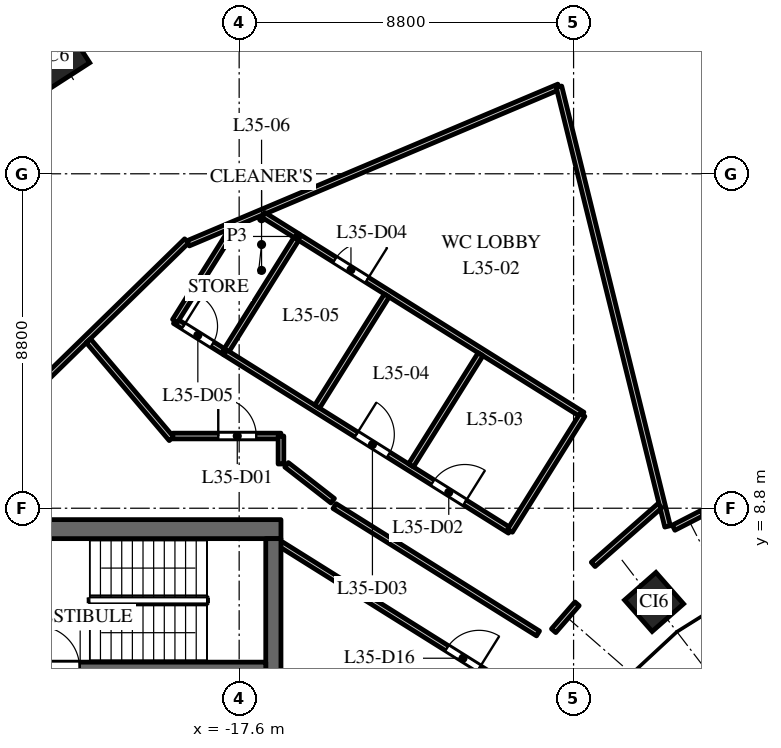
"""IFC4 building model, lengths in metres.
Left out: names, types, materials, properties, quantities, classifications, styles, units other than length and angle.
Written with IfcOpenShell. Run it as: python <this file> out.ifc"""

import sys

from ifc_helpers import new_model, si_unit, direction, frame, frame_2d, origin, origin_2d, place, context, subcontext, project, spatial, rectangle, extrude, element, fill, save


model = new_model("IFC4")
c1 = context("Model", 3, precision=1e-05, world=origin(), true_north=direction((0.0, 1.0)))
c2 = subcontext(c1, "Body", "Model", "MODEL_VIEW")
j1 = project(units=[si_unit("LENGTHUNIT", "METRE"), si_unit("PLANEANGLEUNIT", "RADIAN")], contexts=[c1])
p1 = place(None, origin())
s1 = spatial("IfcSite", under=j1, at=p1, CompositionType="ELEMENT")
p2 = place(p1, origin())
s2 = spatial("IfcBuilding", under=s1, at=p2, CompositionType="ELEMENT")
p3 = place(p2, frame((0.0, 0.0, 154.0)))
s3 = spatial("IfcBuildingStorey", under=s2, at=p3, CompositionType="ELEMENT", Elevation=154.0)
p4 = place(p3, frame((-22.362, 20.7, 0.0), z_axis=(0.0, 0.0, 1.0), x_axis=(-0.840247639643, -0.542202825586, 0.0)))
e1 = element("IfcColumn", 1, at=p4, inside=s3, PredefinedType="COLUMN", context=c2, shape_type="SweptSolid", body=[
    extrude(rectangle(XDim=1.2, YDim=1.2, at=origin_2d()), origin(), (0.0, 0.0, 1.0), 4.0),
])
p5 = place(p3, frame((-6.682, 6.334, 0.0), z_axis=(0.0, 0.0, 1.0), x_axis=(-0.75102249095, -0.660276622399, 0.0)))
e2 = element("IfcColumn", 2, at=p5, inside=s3, PredefinedType="COLUMN", context=c2, shape_type="SweptSolid", body=[
    extrude(rectangle(XDim=1.1, YDim=1.1, at=origin_2d()), origin(), (0.0, 0.0, 1.0), 4.0),
])
p6 = place(p3, frame((-16.5, 8.25, 0.0), z_axis=(0.0, 0.0, 1.0), x_axis=(-1.0, 0.0, 0.0)))
e3 = element("IfcWall", 3, at=p6, inside=s3, PredefinedType="SHEAR", context=c2, shape_type="SweptSolid", body=[
    extrude(rectangle(XDim=15.0, YDim=0.5, at=frame_2d((7.5, 0.0))), origin(), (0.0, 0.0, 1.0), 3.7),
])
p7 = place(p6, frame((6.9, 0.0, 0.0)))
e4 = element("IfcOpeningElement", 4, at=p7, cuts=e3, PredefinedType="OPENING", context=c2, shape_type="SweptSolid", body=[
    extrude(rectangle(XDim=1.2, YDim=2.1, at=frame_2d((0.6, 1.05))), frame((0.0, 0.26, 0.0), z_axis=(0.0, -1.0, 0.0), x_axis=(1.0, 0.0, 0.0)), (0.0, 0.0, 1.0), 0.52),
])
p8 = place(p6, frame((12.05, 0.0, 0.0)))
e5 = element("IfcOpeningElement", 5, at=p8, cuts=e3, PredefinedType="OPENING", context=c2, shape_type="SweptSolid", body=[
    extrude(rectangle(XDim=0.9, YDim=2.1, at=frame_2d((0.45, 1.05))), frame((0.0, 0.26, 0.0), z_axis=(0.0, -1.0, 0.0), x_axis=(1.0, 0.0, 0.0)), (0.0, 0.0, 1.0), 0.52),
])
p9 = place(p3, frame((-16.7, -8.0, 0.0), z_axis=(0.0, 0.0, 1.0), x_axis=(0.0, 1.0, 0.0)))
e6 = element("IfcWall", 6, at=p9, inside=s3, PredefinedType="SHEAR", context=c2, shape_type="SweptSolid", body=[
    extrude(rectangle(XDim=16.0, YDim=0.4, at=frame_2d((8.0, 0.0))), origin(), (0.0, 0.0, 1.0), 3.7),
])
p10 = place(p3, frame((-16.9, 4.6, 0.0), z_axis=(0.0, 0.0, 1.0), x_axis=(-1.0, 0.0, 0.0)))
e7 = element("IfcWall", 7, at=p10, inside=s3, PredefinedType="SHEAR", context=c2, shape_type="SweptSolid", body=[
    extrude(rectangle(XDim=6.18, YDim=0.3, at=frame_2d((3.09, 0.0))), origin(), (0.0, 0.0, 1.0), 3.7),
])
p11 = place(p10, frame((4.9, 0.0, 0.0)))
e8 = element("IfcOpeningElement", 8, at=p11, cuts=e7, PredefinedType="OPENING", context=c2, shape_type="SweptSolid", body=[
    extrude(rectangle(XDim=1.1, YDim=2.1, at=frame_2d((0.55, 1.05))), frame((0.0, 0.16, 0.0), z_axis=(0.0, -1.0, 0.0), x_axis=(1.0, 0.0, 0.0)), (0.0, 0.0, 1.0), 0.32),
])
p12 = place(p3, frame((-24.166, 10.778, 0.0), z_axis=(0.0, 0.0, 1.0), x_axis=(0.715834142481, 0.698270349119, 0.0)))
e9 = element("IfcWall", 9, at=p12, inside=s3, PredefinedType="PARTITIONING", context=c2, shape_type="SweptSolid", body=[
    extrude(rectangle(XDim=7.242, YDim=0.15, at=frame_2d((3.621, 0.0))), origin(), (0.0, 0.0, 1.0), 2.75),
])
p13 = place(p3, frame((-21.568, 13.207, 0.0), z_axis=(0.0, 0.0, 1.0), x_axis=(0.646414818584, -0.762986161287, 0.0)))
e10 = element("IfcWall", 10, at=p13, inside=s3, PredefinedType="PARTITIONING", context=c2, shape_type="SweptSolid", body=[
    extrude(rectangle(XDim=3.38, YDim=0.15, at=frame_2d((1.69, 0.0))), origin(), (0.0, 0.0, 1.0), 3.7),
])
p14 = place(p3, frame((-19.347, 10.7, 0.0), z_axis=(0.0, 0.0, 1.0), x_axis=(1.0, 0.0, 0.0)))
e11 = element("IfcWall", 11, at=p14, inside=s3, PredefinedType="PARTITIONING", context=c2, shape_type="SweptSolid", body=[
    extrude(rectangle(XDim=2.847, YDim=0.15, at=frame_2d((1.423, 0.0))), origin(), (0.0, 0.0, 1.0), 3.7),
])
p15 = place(p14, frame((1.197, 0.0, 0.0)))
e12 = element("IfcOpeningElement", 12, at=p15, cuts=e11, PredefinedType="OPENING", context=c2, shape_type="SweptSolid", body=[
    extrude(rectangle(XDim=1.0, YDim=2.1, at=frame_2d((0.5, 1.05))), frame((0.0, 0.085, 0.0), z_axis=(0.0, -1.0, 0.0), x_axis=(1.0, 0.0, 0.0)), (0.0, 0.0, 1.0), 0.17),
])
p16 = place(p3, frame((-19.289, 13.727, 0.0), z_axis=(0.0, 0.0, 1.0), x_axis=(0.847461540706, -0.530856795213, 0.0)))
e13 = element("IfcWall", 13, at=p16, inside=s3, PredefinedType="PARTITIONING", context=c2, shape_type="SweptSolid", body=[
    extrude(rectangle(XDim=1.56, YDim=0.15, at=frame_2d((0.78, 0.0))), origin(), (0.0, 0.0, 1.0), 2.75),
])
p17 = place(p16, frame((0.26, 0.0, 0.0)))
e14 = element("IfcOpeningElement", 14, at=p17, cuts=e13, PredefinedType="OPENING", context=c2, shape_type="SweptSolid", body=[
    extrude(rectangle(XDim=0.9, YDim=2.1, at=frame_2d((0.45, 1.05))), frame((0.0, 0.085, 0.0), z_axis=(0.0, -1.0, 0.0), x_axis=(1.0, 0.0, 0.0)), (0.0, 0.0, 1.0), 0.17),
])
p18 = place(p3, frame((-19.289, 13.727, 0.0), z_axis=(0.0, 0.0, 1.0), x_axis=(0.530805348015, 0.847493765475, 0.0)))
e15 = element("IfcWall", 15, at=p18, inside=s3, PredefinedType="PARTITIONING", context=c2, shape_type="SweptSolid", body=[
    extrude(rectangle(XDim=2.911, YDim=0.15, at=frame_2d((1.456, 0.0))), origin(), (0.0, 0.0, 1.0), 3.7),
])
p19 = place(p3, frame((-18.94, 15.771, 0.0), z_axis=(0.0, 0.0, 1.0), x_axis=(0.921243869672, 0.3889855172, 0.0)))
e16 = element("IfcWall", 16, at=p19, inside=s3, PredefinedType="PARTITIONING", context=c2, shape_type="SweptSolid", body=[
    extrude(rectangle(XDim=10.589, YDim=0.15, at=frame_2d((5.294, 0.0))), origin(), (0.0, 0.0, 1.0), 2.85),
])
p20 = place(p3, frame((-17.967, 12.899, 0.0), z_axis=(0.0, 0.0, 1.0), x_axis=(0.530723957916, 0.847544736574, 0.0)))
e17 = element("IfcWall", 17, at=p20, inside=s3, PredefinedType="PARTITIONING", context=c2, shape_type="SweptSolid", body=[
    extrude(rectangle(XDim=3.601, YDim=0.15, at=frame_2d((1.801, 0.0))), origin(), (0.0, 0.0, 1.0), 3.7),
])
p21 = place(p3, frame((-17.967, 12.899, 0.0), z_axis=(0.0, 0.0, 1.0), x_axis=(0.847599321369, -0.530636778234, 0.0)))
e18 = element("IfcWall", 18, at=p21, inside=s3, PredefinedType="PARTITIONING", context=c2, shape_type="SweptSolid", body=[
    extrude(rectangle(XDim=8.84, YDim=0.15, at=frame_2d((4.42, 0.0))), origin(), (0.0, 0.0, 1.0), 2.75),
])
p22 = place(p21, frame((6.44, 0.0, 0.0)))
e19 = element("IfcOpeningElement", 19, at=p22, cuts=e18, PredefinedType="OPENING", context=c2, shape_type="SweptSolid", body=[
    extrude(rectangle(XDim=1.0, YDim=2.1, at=frame_2d((0.5, 1.05))), frame((0.0, 0.085, 0.0), z_axis=(0.0, -1.0, 0.0), x_axis=(1.0, 0.0, 0.0)), (0.0, 0.0, 1.0), 0.17),
])
p23 = place(p21, frame((4.071, 0.0, 0.0)))
e20 = element("IfcOpeningElement", 20, at=p23, cuts=e18, PredefinedType="OPENING", context=c2, shape_type="SweptSolid", body=[
    extrude(rectangle(XDim=1.0, YDim=2.1, at=frame_2d((0.5, 1.05))), frame((0.0, 0.085, 0.0), z_axis=(0.0, -1.0, 0.0), x_axis=(1.0, 0.0, 0.0)), (0.0, 0.0, 1.0), 0.17),
])
p24 = place(p3, frame((-16.965, 16.519, 0.0), z_axis=(0.0, 0.0, 1.0), x_axis=(0.848049474304, -0.529917058729, 0.0)))
e21 = element("IfcWall", 21, at=p24, inside=s3, PredefinedType="PARTITIONING", context=c2, shape_type="SweptSolid", body=[
    extrude(rectangle(XDim=1.072, YDim=0.15, at=frame_2d((0.536, 0.0))), origin(), (0.0, 0.0, 1.0), 3.7),
])
p25 = place(p3, frame((-16.5, 9.964, 0.0), z_axis=(0.0, 0.0, 1.0), x_axis=(0.0, 1.0, 0.0)))
e22 = element("IfcWall", 22, at=p25, inside=s3, PredefinedType="PARTITIONING", context=c2, shape_type="SweptSolid", body=[
    extrude(rectangle(XDim=0.736, YDim=0.15, at=frame_2d((0.368, 0.0))), origin(), (0.0, 0.0, 1.0), 3.7),
])
p26 = place(p3, frame((-16.057, 15.95, 0.0), z_axis=(0.0, 0.0, 1.0), x_axis=(0.847655082048, -0.530547699908, 0.0)))
e23 = element("IfcWall", 23, at=p26, inside=s3, PredefinedType="PARTITIONING", context=c2, shape_type="SweptSolid", body=[
    extrude(rectangle(XDim=8.836, YDim=0.15, at=frame_2d((4.418, 0.0))), origin(), (0.0, 0.0, 1.0), 2.85),
])
p27 = place(p26, frame((1.15, 0.0, 0.0)))
e24 = element("IfcOpeningElement", 24, at=p27, cuts=e23, PredefinedType="OPENING", context=c2, shape_type="SweptSolid", body=[
    extrude(rectangle(XDim=1.0, YDim=2.1, at=frame_2d((0.5, 1.05))), frame((0.0, 0.085, 0.0), z_axis=(0.0, -1.0, 0.0), x_axis=(1.0, 0.0, 0.0)), (0.0, 0.0, 1.0), 0.17),
])
p28 = place(p3, frame((-16.5, 7.851, 0.0), z_axis=(0.0, 0.0, 1.0), x_axis=(0.847690706888, -0.530490777917, 0.0)))
e25 = element("IfcWall", 25, at=p28, inside=s3, PredefinedType="PARTITIONING", context=c2, shape_type="SweptSolid", body=[
    extrude(rectangle(XDim=6.781, YDim=0.15, at=frame_2d((3.39, 0.0))), origin(), (0.0, 0.0, 1.0), 3.7),
])
p29 = place(p28, frame((5.151, 0.0, 0.0)))
e26 = element("IfcOpeningElement", 26, at=p29, cuts=e25, PredefinedType="OPENING", context=c2, shape_type="SweptSolid", body=[
    extrude(rectangle(XDim=1.0, YDim=2.1, at=frame_2d((0.5, 1.05))), frame((0.0, 0.085, 0.0), z_axis=(0.0, -1.0, 0.0), x_axis=(1.0, 0.0, 0.0)), (0.0, 0.0, 1.0), 0.17),
])
p30 = place(p3, frame((-15.547, 11.473, 0.0), z_axis=(0.0, 0.0, 1.0), x_axis=(0.530730236176, 0.847540805158, 0.0)))
e27 = element("IfcWall", 27, at=p30, inside=s3, PredefinedType="PARTITIONING", context=c2, shape_type="SweptSolid", body=[
    extrude(rectangle(XDim=3.45, YDim=0.15, at=frame_2d((1.725, 0.0))), origin(), (0.0, 0.0, 1.0), 3.7),
])
p31 = place(p3, frame((-15.089, 8.856, 0.0), z_axis=(0.0, 0.0, 1.0), x_axis=(0.847611500167, -0.53061732424, 0.0)))
e28 = element("IfcWall", 28, at=p31, inside=s3, PredefinedType="PARTITIONING", context=c2, shape_type="SweptSolid", body=[
    extrude(rectangle(XDim=6.315, YDim=0.15, at=frame_2d((3.158, 0.0))), origin(), (0.0, 0.0, 1.0), 3.7),
])
p32 = place(p3, frame((-13.078, 9.928, 0.0), z_axis=(0.0, 0.0, 1.0), x_axis=(0.530603340991, 0.847620253727, 0.0)))
e29 = element("IfcWall", 29, at=p32, inside=s3, PredefinedType="PARTITIONING", context=c2, shape_type="SweptSolid", body=[
    extrude(rectangle(XDim=3.448, YDim=0.15, at=frame_2d((1.724, 0.0))), origin(), (0.0, 0.0, 1.0), 3.7),
])
p33 = place(p3, frame((-10.474, 8.208, 0.0), z_axis=(0.0, 0.0, 1.0), x_axis=(0.530627347961, 0.847605225088, 0.0)))
e30 = element("IfcWall", 30, at=p33, inside=s3, PredefinedType="PARTITIONING", context=c2, shape_type="SweptSolid", body=[
    extrude(rectangle(XDim=3.596, YDim=0.15, at=frame_2d((1.798, 0.0))), origin(), (0.0, 0.0, 1.0), 2.85),
])
p34 = place(p3, frame((-9.325, 5.577, 0.0), z_axis=(0.0, 0.0, 1.0), x_axis=(0.656365478363, 0.754443078578, 0.0)))
e31 = element("IfcWall", 31, at=p34, inside=s3, PredefinedType="PARTITIONING", context=c2, shape_type="SweptSolid", body=[
    extrude(rectangle(XDim=0.938, YDim=0.15, at=frame_2d((0.469, 0.0))), origin(), (0.0, 0.0, 1.0), 2.75),
])
p35 = place(p3, frame((-9.185, 19.89, 0.0), z_axis=(0.0, 0.0, 1.0), x_axis=(0.239863913553, -0.970806521906, 0.0)))
e32 = element("IfcWall", 32, at=p35, inside=s3, PredefinedType="PARTITIONING", context=c2, shape_type="SweptSolid", body=[
    extrude(rectangle(XDim=11.916, YDim=0.15, at=frame_2d((5.958, 0.0))), origin(), (0.0, 0.0, 1.0), 3.7),
])
p36 = place(p3, frame((-8.284, 7.322, 0.0), z_axis=(0.0, 0.0, 1.0), x_axis=(0.750605726473, 0.660750363894, 0.0)))
e33 = element("IfcWall", 33, at=p36, inside=s3, PredefinedType="PARTITIONING", context=c2, shape_type="SweptSolid", body=[
    extrude(rectangle(XDim=2.337, YDim=0.15, at=frame_2d((1.168, 0.0))), origin(), (0.0, 0.0, 1.0), 2.85),
])
p37 = place(p3, frame((-6.168, 8.287, 0.0), z_axis=(0.0, 0.0, 1.0), x_axis=(0.889398654128, 0.457132403178, 0.0)))
e34 = element("IfcWall", 34, at=p37, inside=s3, PredefinedType="PARTITIONING", context=c2, shape_type="SweptSolid", body=[
    extrude(rectangle(XDim=0.844, YDim=0.15, at=frame_2d((0.422, 0.0))), origin(), (0.0, 0.0, 1.0), 3.7),
])
p38 = place(p3, frame((-16.352, 9.942, 0.0), z_axis=(0.0, 0.0, 1.0), x_axis=(0.788950226826, -0.614457109643, 0.0)))
e35 = element("IfcWall", 35, at=p38, inside=s3, PredefinedType="PARTITIONING", context=c2, shape_type="SweptSolid", body=[
    extrude(rectangle(XDim=1.538, YDim=0.15, at=frame_2d((0.769, 0.0))), origin(), (0.0, 0.0, 1.0), 3.7),
])
p39 = place(p11, origin())
e36 = element("IfcDoor", 36, at=p39, inside=s3, OperationType="SINGLE_SWING_RIGHT", PredefinedType="DOOR", context=c2, shape_type="SweptSolid", body=[
    extrude(rectangle(XDim=1.1, YDim=2.1, at=frame_2d((0.55, 1.05))), frame((0.0, 0.025, 0.0), z_axis=(0.0, -1.0, 0.0), x_axis=(1.0, 0.0, 0.0)), (0.0, 0.0, 1.0), 0.05),
])
fill(e8, e36)
p40 = place(p15, origin())
e37 = element("IfcDoor", 37, at=p40, inside=s3, OperationType="SINGLE_SWING_LEFT", PredefinedType="DOOR", context=c2, shape_type="SweptSolid", body=[
    extrude(rectangle(XDim=1.0, YDim=2.1, at=frame_2d((0.5, 1.05))), frame((0.0, 0.025, 0.0), z_axis=(0.0, -1.0, 0.0), x_axis=(1.0, 0.0, 0.0)), (0.0, 0.0, 1.0), 0.05),
])
fill(e12, e37)
p41 = place(p22, origin())
e38 = element("IfcDoor", 38, at=p41, inside=s3, OperationType="SINGLE_SWING_RIGHT", PredefinedType="DOOR", context=c2, shape_type="SweptSolid", body=[
    extrude(rectangle(XDim=1.0, YDim=2.1, at=frame_2d((0.5, 1.05))), frame((0.0, 0.025, 0.0), z_axis=(0.0, -1.0, 0.0), x_axis=(1.0, 0.0, 0.0)), (0.0, 0.0, 1.0), 0.05),
])
fill(e19, e38)
p42 = place(p23, origin())
e39 = element("IfcDoor", 39, at=p42, inside=s3, OperationType="SINGLE_SWING_LEFT", PredefinedType="DOOR", context=c2, shape_type="SweptSolid", body=[
    extrude(rectangle(XDim=1.0, YDim=2.1, at=frame_2d((0.5, 1.05))), frame((0.0, 0.025, 0.0), z_axis=(0.0, -1.0, 0.0), x_axis=(1.0, 0.0, 0.0)), (0.0, 0.0, 1.0), 0.05),
])
fill(e20, e39)
p43 = place(p27, origin())
e40 = element("IfcDoor", 40, at=p43, inside=s3, OperationType="SINGLE_SWING_RIGHT", PredefinedType="DOOR", context=c2, shape_type="SweptSolid", body=[
    extrude(rectangle(XDim=1.0, YDim=2.1, at=frame_2d((0.5, 1.05))), frame((0.0, 0.025, 0.0), z_axis=(0.0, -1.0, 0.0), x_axis=(1.0, 0.0, 0.0)), (0.0, 0.0, 1.0), 0.05),
])
fill(e24, e40)
p44 = place(p17, origin())
e41 = element("IfcDoor", 41, at=p44, inside=s3, OperationType="SINGLE_SWING_LEFT", PredefinedType="DOOR", context=c2, shape_type="SweptSolid", body=[
    extrude(rectangle(XDim=0.9, YDim=2.1, at=frame_2d((0.45, 1.05))), frame((0.0, 0.025, 0.0), z_axis=(0.0, -1.0, 0.0), x_axis=(1.0, 0.0, 0.0)), (0.0, 0.0, 1.0), 0.05),
])
fill(e14, e41)
p45 = place(p29, origin())
e42 = element("IfcDoor", 42, at=p45, inside=s3, OperationType="SINGLE_SWING_RIGHT", PredefinedType="DOOR", context=c2, shape_type="SweptSolid", body=[
    extrude(rectangle(XDim=1.0, YDim=2.1, at=frame_2d((0.5, 1.05))), frame((0.0, 0.025, 0.0), z_axis=(0.0, -1.0, 0.0), x_axis=(1.0, 0.0, 0.0)), (0.0, 0.0, 1.0), 0.05),
])
fill(e26, e42)
save(model, sys.argv[1])
